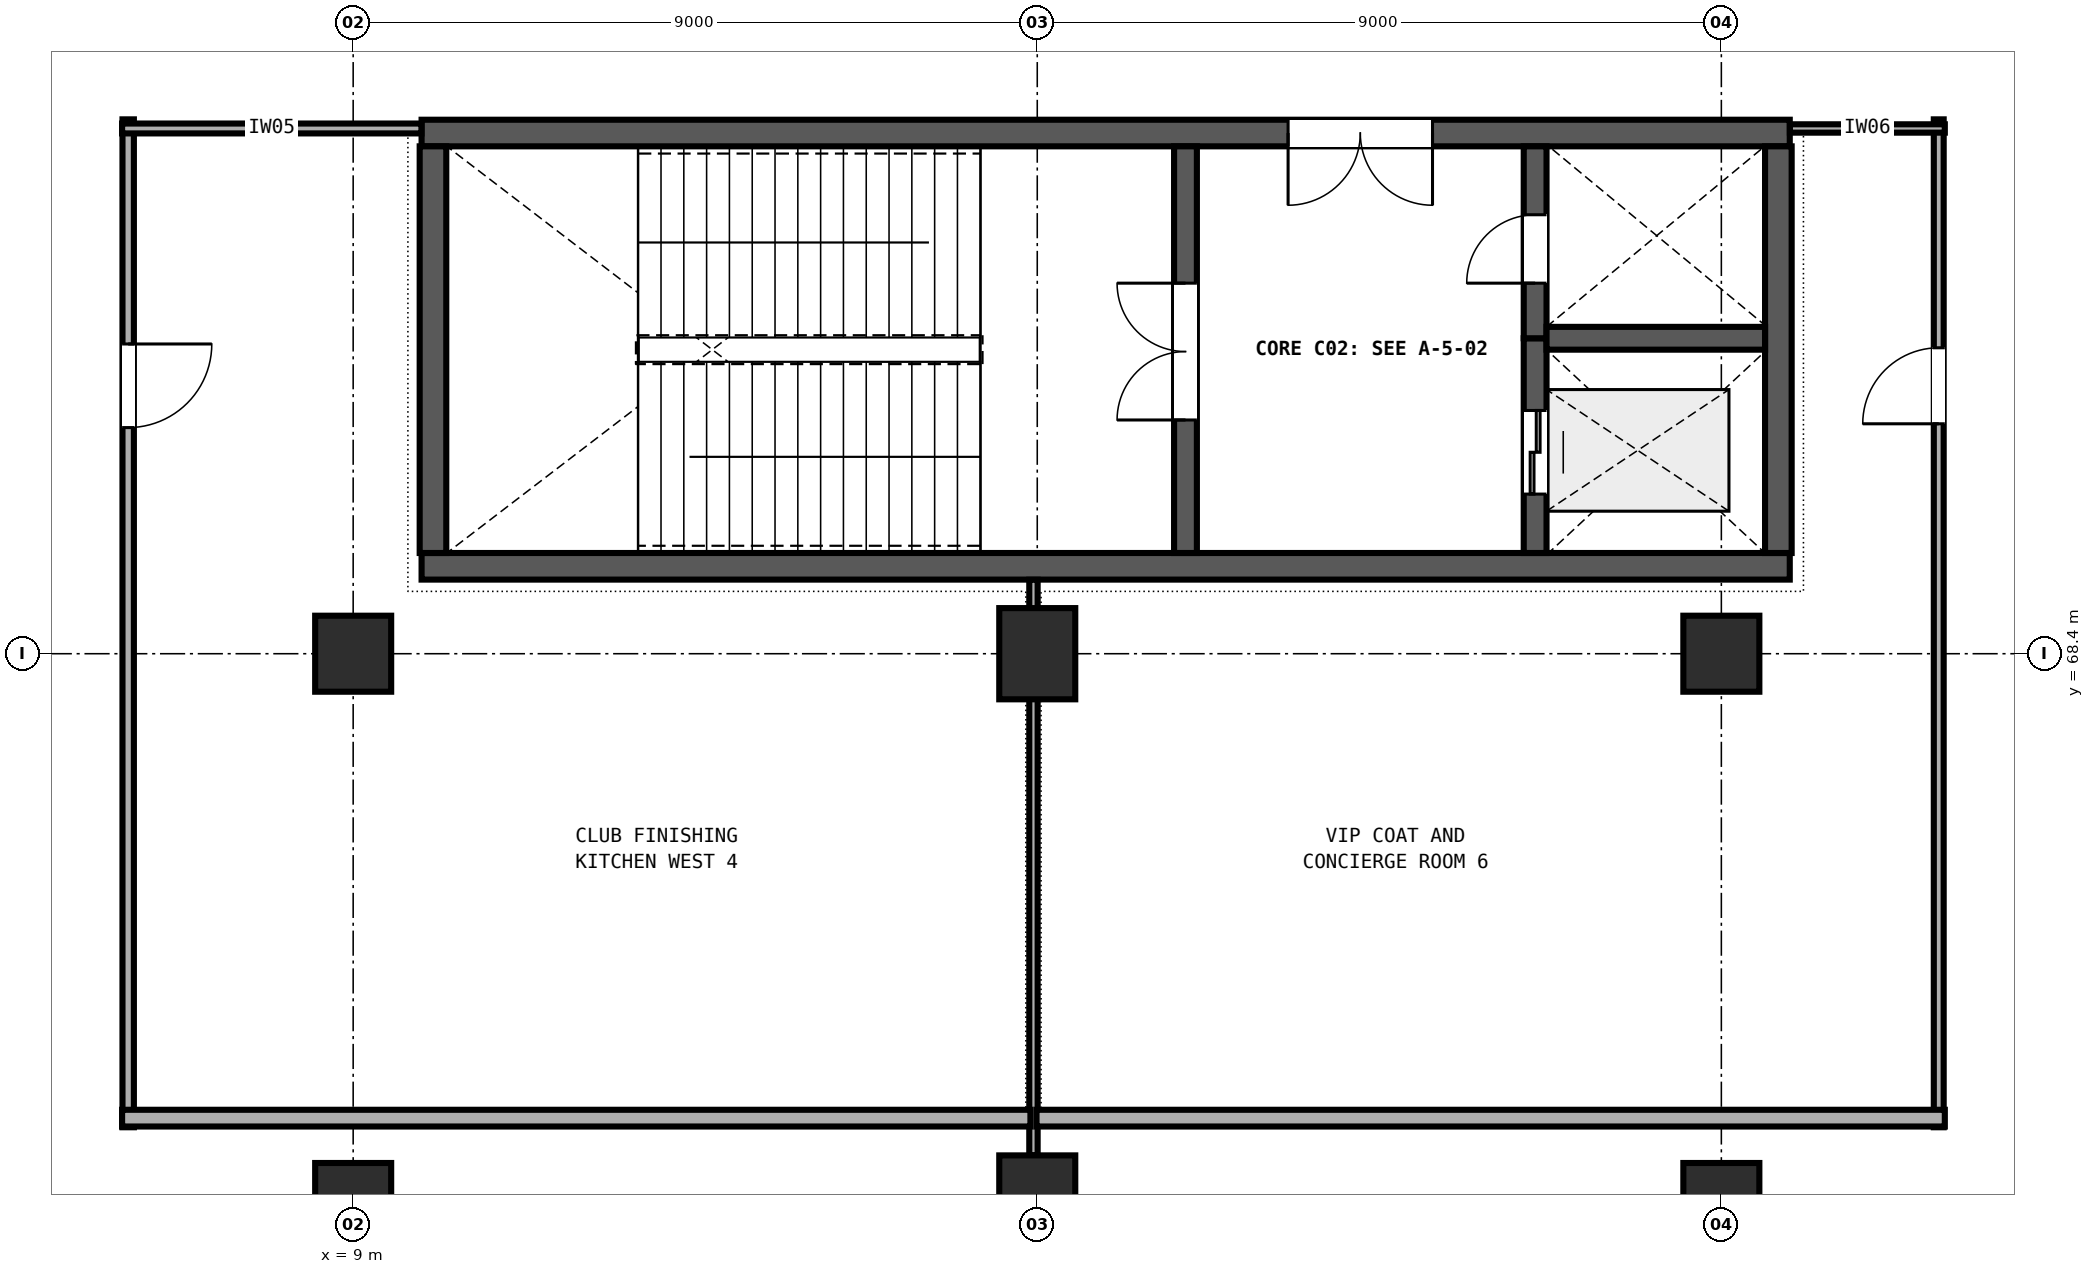
"""IFC4 building model, lengths in metres.
Left out: names, types, materials, properties, quantities, classifications, styles, units other than length and angle.
Written with IfcOpenShell. Run it as: python <this file> out.ifc"""

import sys

from ifc_helpers import new_model, si_unit, direction, frame, frame_2d, origin, origin_2d, place, context, subcontext, project, spatial, rectangle, extrude, element, fill, save


model = new_model("IFC4")
c1 = context("Model", 3, precision=1e-05, world=origin(), true_north=direction((0.0, 1.0)))
c2 = subcontext(c1, "Body", "Model", "MODEL_VIEW")
j1 = project(units=[si_unit("LENGTHUNIT", "METRE"), si_unit("PLANEANGLEUNIT", "RADIAN")], contexts=[c1])
p1 = place(None, origin())
s1 = spatial("IfcSite", under=j1, at=p1, CompositionType="ELEMENT")
p2 = place(p1, origin())
s2 = spatial("IfcBuilding", under=s1, at=p2, CompositionType="ELEMENT")
p3 = place(p2, frame((0.0, 0.0, 9.6)))
s3 = spatial("IfcBuildingStorey", under=s2, at=p3, CompositionType="ELEMENT", Elevation=9.6)
for number, where, z_axis, x_axis in (
    (1, (9.0, 61.2, 0.0), (0.0, 0.0, 1.0), (1.0, 0.0, 0.0)),
    (2, (9.0, 68.4, 0.0), (0.0, 0.0, 1.0), (1.0, 0.0, 0.0)),
):
    element("IfcColumn", number, at=place(p3, frame(where, z_axis=z_axis, x_axis=x_axis)), inside=s3, PredefinedType="COLUMN", context=c2, shape_type="SweptSolid", body=[
        extrude(rectangle(XDim=1.0, YDim=1.0, at=origin_2d()), origin(), (0.0, 0.0, 1.0), 4.8),
    ])
for number, where, z_axis, x_axis in (
    (3, (18.0, 61.2, 0.0), (0.0, 0.0, 1.0), (1.0, 0.0, 0.0)),
    (4, (18.0, 68.4, 0.0), (0.0, 0.0, 1.0), (1.0, 0.0, 0.0)),
):
    element("IfcColumn", number, at=place(p3, frame(where, z_axis=z_axis, x_axis=x_axis)), inside=s3, PredefinedType="COLUMN", context=c2, shape_type="SweptSolid", body=[
        extrude(rectangle(XDim=1.0, YDim=1.2, at=origin_2d()), origin(), (0.0, 0.0, 1.0), 4.8),
    ])
for number, where, z_axis, x_axis in (
    (5, (27.0, 61.2, 0.0), (0.0, 0.0, 1.0), (1.0, 0.0, 0.0)),
    (6, (27.0, 68.4, 0.0), (0.0, 0.0, 1.0), (1.0, 0.0, 0.0)),
):
    element("IfcColumn", number, at=place(p3, frame(where, z_axis=z_axis, x_axis=x_axis)), inside=s3, PredefinedType="COLUMN", context=c2, shape_type="SweptSolid", body=[
        extrude(rectangle(XDim=1.0, YDim=1.0, at=origin_2d()), origin(), (0.0, 0.0, 1.0), 4.8),
    ])
p4 = place(p3, frame((9.9, 69.55, 0.0), z_axis=(0.0, 0.0, 1.0), x_axis=(1.0, 0.0, 0.0)))
e7 = element("IfcWall", 7, at=p4, inside=s3, PredefinedType="SHEAR", context=c2, shape_type="SweptSolid", body=[
    extrude(rectangle(XDim=18.0, YDim=0.35, at=frame_2d((9.0, 0.0))), origin(), (0.0, 0.0, 1.0), 4.5),
])
p5 = place(p3, frame((27.9, 75.25, 0.0), z_axis=(0.0, 0.0, 1.0), x_axis=(-1.0, 0.0, 0.0)))
e8 = element("IfcWall", 8, at=p5, inside=s3, PredefinedType="SHEAR", context=c2, shape_type="SweptSolid", body=[
    extrude(rectangle(XDim=18.0, YDim=0.35, at=frame_2d((9.0, 0.0))), origin(), (0.0, 0.0, 1.0), 4.5),
])
p6 = place(p5, frame((4.7, 0.0, 0.0)))
e9 = element("IfcOpeningElement", 9, at=p6, cuts=e8, PredefinedType="OPENING", context=c2, shape_type="SweptSolid", body=[
    extrude(rectangle(XDim=1.9, YDim=2.25, at=frame_2d((0.95, 1.125))), frame((0.0, 0.185, 0.0), z_axis=(0.0, -1.0, 0.0), x_axis=(1.0, 0.0, 0.0)), (0.0, 0.0, 1.0), 0.37),
])
for number, where, z_axis, x_axis in (
    (10, (10.05, 75.075, 0.0), (0.0, 0.0, 1.0), (0.0, -1.0, 0.0)),
    (11, (27.75, 69.725, 0.0), (0.0, 0.0, 1.0), (0.0, 1.0, 0.0)),
):
    element("IfcWall", number, at=place(p3, frame(where, z_axis=z_axis, x_axis=x_axis)), inside=s3, PredefinedType="SHEAR", context=c2, shape_type="SweptSolid", body=[
        extrude(rectangle(XDim=5.35, YDim=0.35, at=frame_2d((2.675, 0.0))), origin(), (0.0, 0.0, 1.0), 4.5),
    ])
p7 = place(p3, frame((19.95, 69.725, 0.0), z_axis=(0.0, 0.0, 1.0), x_axis=(0.0, 1.0, 0.0)))
e12 = element("IfcWall", 12, at=p7, inside=s3, PredefinedType="SHEAR", context=c2, shape_type="SweptSolid", body=[
    extrude(rectangle(XDim=5.35, YDim=0.3, at=frame_2d((2.675, 0.0))), origin(), (0.0, 0.0, 1.0), 4.5),
])
p8 = place(p7, frame((1.75, 0.0, 0.0)))
e13 = element("IfcOpeningElement", 13, at=p8, cuts=e12, PredefinedType="OPENING", context=c2, shape_type="SweptSolid", body=[
    extrude(rectangle(XDim=1.8, YDim=2.25, at=frame_2d((0.9, 1.125))), frame((0.0, 0.16, 0.0), z_axis=(0.0, -1.0, 0.0), x_axis=(1.0, 0.0, 0.0)), (0.0, 0.0, 1.0), 0.32),
])
p9 = place(p3, frame((24.55, 69.725, 0.0), z_axis=(0.0, 0.0, 1.0), x_axis=(0.0, 1.0, 0.0)))
e14 = element("IfcWall", 14, at=p9, inside=s3, PredefinedType="SHEAR", context=c2, shape_type="SweptSolid", body=[
    extrude(rectangle(XDim=2.825, YDim=0.3, at=frame_2d((1.413, 0.0))), origin(), (0.0, 0.0, 1.0), 4.5),
])
p10 = place(p9, frame((0.775, 0.0, 0.0)))
e15 = element("IfcOpeningElement", 15, at=p10, cuts=e14, PredefinedType="OPENING", context=c2, shape_type="SweptSolid", body=[
    extrude(rectangle(XDim=1.1, YDim=2.1, at=frame_2d((0.55, 1.05))), frame((0.0, 0.16, 0.0), z_axis=(0.0, -1.0, 0.0), x_axis=(1.0, 0.0, 0.0)), (0.0, 0.0, 1.0), 0.32),
])
p11 = place(p3, frame((24.55, 72.55, 0.0), z_axis=(0.0, 0.0, 1.0), x_axis=(0.0, 1.0, 0.0)))
e16 = element("IfcWall", 16, at=p11, inside=s3, PredefinedType="SHEAR", context=c2, shape_type="SweptSolid", body=[
    extrude(rectangle(XDim=2.525, YDim=0.3, at=frame_2d((1.262, 0.0))), origin(), (0.0, 0.0, 1.0), 4.5),
])
p12 = place(p11, frame((0.725, 0.0, 0.0)))
e17 = element("IfcOpeningElement", 17, at=p12, cuts=e16, PredefinedType="OPENING", context=c2, shape_type="SweptSolid", body=[
    extrude(rectangle(XDim=0.9, YDim=2.1, at=frame_2d((0.45, 1.05))), frame((0.0, 0.16, 0.0), z_axis=(0.0, -1.0, 0.0), x_axis=(1.0, 0.0, 0.0)), (0.0, 0.0, 1.0), 0.32),
])
p13 = place(p3, frame((24.7, 72.55, 0.0), z_axis=(0.0, 0.0, 1.0), x_axis=(1.0, 0.0, 0.0)))
e18 = element("IfcWall", 18, at=p13, inside=s3, PredefinedType="SHEAR", context=c2, shape_type="SweptSolid", body=[
    extrude(rectangle(XDim=2.875, YDim=0.3, at=frame_2d((1.438, 0.0))), origin(), (0.0, 0.0, 1.0), 4.5),
])
p14 = place(p3, frame((6.04, 75.43, 0.0), z_axis=(0.0, 0.0, 1.0), x_axis=(0.0, -1.0, 0.0)))
e19 = element("IfcWall", 19, at=p14, inside=s3, PredefinedType="PARTITIONING", context=c2, shape_type="SweptSolid", body=[
    extrude(rectangle(XDim=13.26, YDim=0.15, at=frame_2d((6.63, 0.0))), origin(), (0.0, 0.0, 1.0), 3.56),
])
p15 = place(p14, frame((2.955, 0.0, 0.0)))
e20 = element("IfcOpeningElement", 20, at=p15, cuts=e19, PredefinedType="OPENING", context=c2, shape_type="SweptSolid", body=[
    extrude(rectangle(XDim=1.1, YDim=2.1, at=frame_2d((0.55, 1.05))), frame((0.0, 0.085, 0.0), z_axis=(0.0, -1.0, 0.0), x_axis=(1.0, 0.0, 0.0)), (0.0, 0.0, 1.0), 0.17),
])
p16 = place(p3, frame((5.96, 75.31, 0.0), z_axis=(0.0, 0.0, 1.0), x_axis=(1.0, 0.0, 0.0)))
e21 = element("IfcWall", 21, at=p16, inside=s3, PredefinedType="PARTITIONING", context=c2, shape_type="SweptSolid", body=[
    extrude(rectangle(XDim=3.938, YDim=0.13, at=frame_2d((1.969, 0.0))), origin(), (0.0, 0.0, 1.0), 3.56),
])
p17 = place(p3, frame((17.95, 69.373, 0.0), z_axis=(0.0, 0.0, 1.0), x_axis=(0.0, -1.0, 0.0)))
e22 = element("IfcWall", 22, at=p17, inside=s3, PredefinedType="PARTITIONING", context=c2, shape_type="SweptSolid", body=[
    extrude(rectangle(XDim=7.571, YDim=0.11, at=frame_2d((3.786, 0.0))), origin(), (0.0, 0.0, 1.0), 3.56),
])
p18 = place(p3, frame((17.91, 62.29, 0.0), z_axis=(0.0, 0.0, 1.0), x_axis=(-1.0, 0.0, 0.0)))
e23 = element("IfcWall", 23, at=p18, inside=s3, PredefinedType="PARTITIONING", context=c2, shape_type="SweptSolid", body=[
    extrude(rectangle(XDim=11.95, YDim=0.22, at=frame_2d((5.975, 0.0))), origin(), (0.0, 0.0, 1.0), 3.56),
])
p19 = place(p3, frame((29.86, 62.17, 0.0), z_axis=(0.0, 0.0, 1.0), x_axis=(0.0, 1.0, 0.0)))
e24 = element("IfcWall", 24, at=p19, inside=s3, PredefinedType="PARTITIONING", context=c2, shape_type="SweptSolid", body=[
    extrude(rectangle(XDim=13.26, YDim=0.13, at=frame_2d((6.63, 0.0))), origin(), (0.0, 0.0, 1.0), 3.56),
])
p20 = place(p19, frame((9.255, 0.0, 0.0)))
e25 = element("IfcOpeningElement", 25, at=p20, cuts=e24, PredefinedType="OPENING", context=c2, shape_type="SweptSolid", body=[
    extrude(rectangle(XDim=1.0, YDim=2.1, at=frame_2d((0.5, 1.05))), frame((0.0, 0.075, 0.0), z_axis=(0.0, -1.0, 0.0), x_axis=(1.0, 0.0, 0.0)), (0.0, 0.0, 1.0), 0.15),
])
p21 = place(p3, frame((27.902, 75.31, 0.0), z_axis=(0.0, 0.0, 1.0), x_axis=(1.0, 0.0, 0.0)))
e26 = element("IfcWall", 26, at=p21, inside=s3, PredefinedType="PARTITIONING", context=c2, shape_type="SweptSolid", body=[
    extrude(rectangle(XDim=2.038, YDim=0.11, at=frame_2d((1.019, 0.0))), origin(), (0.0, 0.0, 1.0), 3.56),
])
p22 = place(p3, frame((29.94, 62.29, 0.0), z_axis=(0.0, 0.0, 1.0), x_axis=(-1.0, 0.0, 0.0)))
e27 = element("IfcWall", 27, at=p22, inside=s3, PredefinedType="PARTITIONING", context=c2, shape_type="SweptSolid", body=[
    extrude(rectangle(XDim=11.95, YDim=0.22, at=frame_2d((5.975, 0.0))), origin(), (0.0, 0.0, 1.0), 3.56),
])
p23 = place(p8, origin())
e28 = element("IfcDoor", 28, at=p23, inside=s3, OperationType="DOUBLE_DOOR_SINGLE_SWING", PredefinedType="DOOR", context=c2, shape_type="SweptSolid", body=[
    extrude(rectangle(XDim=1.8, YDim=2.25, at=frame_2d((0.9, 1.125))), frame((0.0, 0.025, 0.0), z_axis=(0.0, -1.0, 0.0), x_axis=(1.0, 0.0, 0.0)), (0.0, 0.0, 1.0), 0.05),
])
fill(e13, e28)
p24 = place(p12, origin())
e29 = element("IfcDoor", 29, at=p24, inside=s3, OperationType="SINGLE_SWING_LEFT", PredefinedType="DOOR", context=c2, shape_type="SweptSolid", body=[
    extrude(rectangle(XDim=0.9, YDim=2.1, at=frame_2d((0.45, 1.05))), frame((0.0, 0.025, 0.0), z_axis=(0.0, -1.0, 0.0), x_axis=(1.0, 0.0, 0.0)), (0.0, 0.0, 1.0), 0.05),
])
fill(e17, e29)
p25 = place(p10, origin())
e30 = element("IfcDoor", 30, at=p25, inside=s3, OperationType="DOUBLE_DOOR_SLIDING", PredefinedType="DOOR", context=c2, shape_type="SweptSolid", body=[
    extrude(rectangle(XDim=1.1, YDim=2.1, at=frame_2d((0.55, 1.05))), frame((0.0, 0.025, 0.0), z_axis=(0.0, -1.0, 0.0), x_axis=(1.0, 0.0, 0.0)), (0.0, 0.0, 1.0), 0.05),
])
fill(e15, e30)
p26 = place(p6, origin())
e31 = element("IfcDoor", 31, at=p26, inside=s3, OperationType="DOUBLE_DOOR_SINGLE_SWING", PredefinedType="DOOR", context=c2, shape_type="SweptSolid", body=[
    extrude(rectangle(XDim=1.9, YDim=2.25, at=frame_2d((0.95, 1.125))), frame((0.0, 0.025, 0.0), z_axis=(0.0, -1.0, 0.0), x_axis=(1.0, 0.0, 0.0)), (0.0, 0.0, 1.0), 0.05),
])
fill(e9, e31)
p27 = place(p15, origin())
e32 = element("IfcDoor", 32, at=p27, inside=s3, OperationType="SINGLE_SWING_LEFT", PredefinedType="DOOR", context=c2, shape_type="SweptSolid", body=[
    extrude(rectangle(XDim=1.1, YDim=2.1, at=frame_2d((0.55, 1.05))), frame((0.0, 0.025, 0.0), z_axis=(0.0, -1.0, 0.0), x_axis=(1.0, 0.0, 0.0)), (0.0, 0.0, 1.0), 0.05),
])
fill(e20, e32)
p28 = place(p20, origin())
e33 = element("IfcDoor", 33, at=p28, inside=s3, OperationType="SINGLE_SWING_LEFT", PredefinedType="DOOR", context=c2, shape_type="SweptSolid", body=[
    extrude(rectangle(XDim=1.0, YDim=2.1, at=frame_2d((0.5, 1.05))), frame((0.0, 0.025, 0.0), z_axis=(0.0, -1.0, 0.0), x_axis=(1.0, 0.0, 0.0)), (0.0, 0.0, 1.0), 0.05),
])
fill(e25, e33)
save(model, sys.argv[1])
